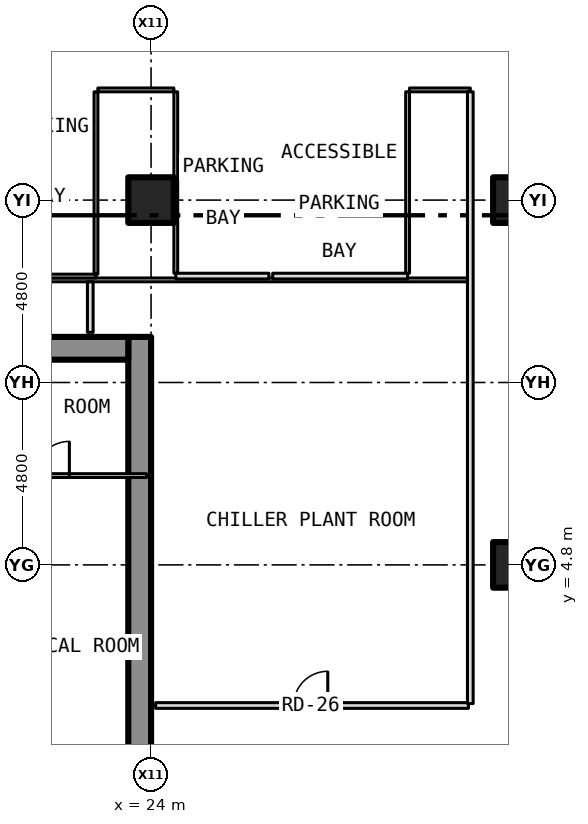
"""IFC4 building model, lengths in metres.
Left out: names, types, materials, properties, quantities, classifications, styles, units other than length and angle.
Written with IfcOpenShell. Run it as: python <this file> out.ifc"""

import sys

from ifc_helpers import new_model, si_unit, direction, frame, frame_2d, origin, origin_2d, place, context, subcontext, project, spatial, rectangle, hollow_rectangle, extrude, element, fill, save


model = new_model("IFC4")
c1 = context("Model", 3, precision=1e-05, world=origin(), true_north=direction((0.0, 1.0)))
c2 = subcontext(c1, "Body", "Model", "MODEL_VIEW")
j1 = project(units=[si_unit("LENGTHUNIT", "METRE"), si_unit("PLANEANGLEUNIT", "RADIAN")], contexts=[c1])
p1 = place(None, origin())
s1 = spatial("IfcSite", under=j1, at=p1, CompositionType="ELEMENT")
p2 = place(p1, origin())
s2 = spatial("IfcBuilding", under=s1, at=p2, CompositionType="ELEMENT")
p3 = place(p2, frame((0.0, 0.0, -5.0)))
s3 = spatial("IfcBuildingStorey", under=s2, at=p3, CompositionType="ELEMENT", Elevation=-5.0)
for number, where, z_axis, x_axis in (
    (1, (33.6, 4.8, -0.3), (0.0, 0.0, 1.0), (1.0, 0.0, 0.0)),
    (2, (33.6, 14.4, -0.3), (0.0, 0.0, 1.0), (1.0, 0.0, 0.0)),
    (3, (24.0, 14.4, -0.3), (0.0, 0.0, 1.0), (1.0, 0.0, 0.0)),
):
    element("IfcColumn", number, at=place(p3, frame(where, z_axis=z_axis, x_axis=x_axis)), inside=s3, PredefinedType="COLUMN", context=c2, shape_type="SweptSolid", body=[
        extrude(hollow_rectangle(XDim=1.2, YDim=1.2, WallThickness=0.07, at=origin_2d()), origin(), (0.0, 0.0, 1.0), 5.0),
    ])
p4 = place(p3, frame((23.7, -10.8, 0.0), z_axis=(0.0, 0.0, 1.0), x_axis=(0.0, 1.0, 0.0)))
e4 = element("IfcWall", 4, at=p4, inside=s3, PredefinedType="SHEAR", context=c2, shape_type="SweptSolid", body=[
    extrude(rectangle(XDim=21.6, YDim=0.6, at=frame_2d((10.8, 0.0))), origin(), (0.0, 0.0, 1.0), 4.7),
])
p5 = place(p3, frame((16.4, 10.5, 0.0), z_axis=(0.0, 0.0, 1.0), x_axis=(1.0, 0.0, 0.0)))
e5 = element("IfcWall", 5, at=p5, inside=s3, PredefinedType="SHEAR", context=c2, shape_type="SweptSolid", body=[
    extrude(rectangle(XDim=7.0, YDim=0.6, at=frame_2d((3.5, 0.0))), origin(), (0.0, 0.0, 1.0), 4.7),
])
p6 = place(p3, frame((24.12, 1.1, 0.0), z_axis=(0.0, 0.0, 1.0), x_axis=(1.0, 0.0, 0.0)))
e6 = element("IfcWall", 6, at=p6, inside=s3, PredefinedType="PARTITIONING", context=c2, shape_type="SweptSolid", body=[
    extrude(rectangle(XDim=8.23, YDim=0.15, at=frame_2d((4.115, 0.0))), origin(), (0.0, 0.0, 1.0), 4.7),
])
p7 = place(p6, frame((3.63, 0.0, 0.0)))
e7 = element("IfcOpeningElement", 7, at=p7, cuts=e6, PredefinedType="OPENING", context=c2, shape_type="SweptSolid", body=[
    extrude(rectangle(XDim=0.9, YDim=2.1, at=frame_2d((0.45, 1.05))), frame((0.0, 0.087, 0.0), z_axis=(0.0, -1.0, 0.0), x_axis=(1.0, 0.0, 0.0)), (0.0, 0.0, 1.0), 0.174),
])
p8 = place(p3, frame((18.8, 7.15, 0.0), z_axis=(0.0, 0.0, 1.0), x_axis=(1.0, 0.0, 0.0)))
e8 = element("IfcWall", 8, at=p8, inside=s3, PredefinedType="PARTITIONING", context=c2, shape_type="SweptSolid", body=[
    extrude(rectangle(XDim=5.08, YDim=0.1, at=frame_2d((2.54, 0.0))), origin(), (0.0, 0.0, 1.0), 4.7),
])
p9 = place(p8, frame((2.15, 0.0, 0.0)))
e9 = element("IfcOpeningElement", 9, at=p9, cuts=e8, PredefinedType="OPENING", context=c2, shape_type="SweptSolid", body=[
    extrude(rectangle(XDim=0.9, YDim=2.1, at=frame_2d((0.45, 1.05))), frame((0.0, 0.062, 0.0), z_axis=(0.0, -1.0, 0.0), x_axis=(1.0, 0.0, 0.0)), (0.0, 0.0, 1.0), 0.124),
])
p10 = place(p3, frame((-37.6, 12.3, 0.0), z_axis=(0.0, 0.0, 1.0), x_axis=(1.0, 0.0, 0.0)))
e10 = element("IfcWall", 10, at=p10, inside=s3, PredefinedType="PARTITIONING", context=c2, shape_type="SweptSolid", body=[
    extrude(rectangle(XDim=70.0, YDim=0.1, at=frame_2d((35.0, 0.0))), origin(), (0.0, 0.0, 1.0), 4.7),
])
p11 = place(p3, frame((20.1, 12.4, 0.0), z_axis=(0.0, 0.0, 1.0), x_axis=(1.0, 0.0, 0.0)))
e11 = element("IfcWall", 11, at=p11, inside=s3, PredefinedType="PARTITIONING", context=c2, shape_type="SweptSolid", body=[
    extrude(rectangle(XDim=2.45, YDim=0.1, at=frame_2d((1.225, 0.0))), origin(), (0.0, 0.0, 1.0), 4.7),
])
p12 = place(p3, frame((24.65, 12.4, 0.0), z_axis=(0.0, 0.0, 1.0), x_axis=(1.0, 0.0, 0.0)))
e12 = element("IfcWall", 12, at=p12, inside=s3, PredefinedType="PARTITIONING", context=c2, shape_type="SweptSolid", body=[
    extrude(rectangle(XDim=2.45, YDim=0.15, at=frame_2d((1.225, 0.0))), origin(), (0.0, 0.0, 1.0), 4.7),
])
p13 = place(p3, frame((27.2, 12.4, 0.0), z_axis=(0.0, 0.0, 1.0), x_axis=(1.0, 0.0, 0.0)))
e13 = element("IfcWall", 13, at=p13, inside=s3, PredefinedType="PARTITIONING", context=c2, shape_type="SweptSolid", body=[
    extrude(rectangle(XDim=3.55, YDim=0.15, at=frame_2d((1.775, 0.0))), origin(), (0.0, 0.0, 1.0), 4.7),
])
p14 = place(p3, frame((22.6, 17.3, 0.0), z_axis=(0.0, 0.0, 1.0), x_axis=(1.0, 0.0, 0.0)))
e14 = element("IfcWall", 14, at=p14, inside=s3, PredefinedType="PARTITIONING", context=c2, shape_type="SweptSolid", body=[
    extrude(rectangle(XDim=2.0, YDim=0.1, at=frame_2d((1.0, 0.0))), origin(), (0.0, 0.0, 1.0), 4.7),
])
p15 = place(p3, frame((30.8, 17.3, 0.0), z_axis=(0.0, 0.0, 1.0), x_axis=(1.0, 0.0, 0.0)))
e15 = element("IfcWall", 15, at=p15, inside=s3, PredefinedType="PARTITIONING", context=c2, shape_type="SweptSolid", body=[
    extrude(rectangle(XDim=1.6, YDim=0.1, at=frame_2d((0.8, 0.0))), origin(), (0.0, 0.0, 1.0), 4.7),
])
p16 = place(p3, frame((22.4, 10.92, 0.0), z_axis=(0.0, 0.0, 1.0), x_axis=(0.0, 1.0, 0.0)))
e16 = element("IfcWall", 16, at=p16, inside=s3, PredefinedType="PARTITIONING", context=c2, shape_type="SweptSolid", body=[
    extrude(rectangle(XDim=1.33, YDim=0.15, at=frame_2d((0.665, 0.0))), origin(), (0.0, 0.0, 1.0), 4.7),
])
p17 = place(p3, frame((22.55, 12.45, 0.0), z_axis=(0.0, 0.0, 1.0), x_axis=(0.0, 1.0, 0.0)))
e17 = element("IfcWall", 17, at=p17, inside=s3, PredefinedType="PARTITIONING", context=c2, shape_type="SweptSolid", body=[
    extrude(rectangle(XDim=4.8, YDim=0.1, at=frame_2d((2.4, 0.0))), origin(), (0.0, 0.0, 1.0), 4.7),
])
for number, where, z_axis, x_axis in (
    (18, (24.65, 12.475, 0.0), (0.0, 0.0, 1.0), (0.0, 1.0, 0.0)),
    (19, (30.75, 12.475, 0.0), (0.0, 0.0, 1.0), (0.0, 1.0, 0.0)),
):
    element("IfcWall", number, at=place(p3, frame(where, z_axis=z_axis, x_axis=x_axis)), inside=s3, PredefinedType="PARTITIONING", context=c2, shape_type="SweptSolid", body=[
        extrude(rectangle(XDim=4.775, YDim=0.1, at=frame_2d((2.387, 0.0))), origin(), (0.0, 0.0, 1.0), 4.7),
    ])
p18 = place(p3, frame((32.4, 1.15, 0.0), z_axis=(0.0, 0.0, 1.0), x_axis=(0.0, 1.0, 0.0)))
e20 = element("IfcWall", 20, at=p18, inside=s3, PredefinedType="PARTITIONING", context=c2, shape_type="SweptSolid", body=[
    extrude(rectangle(XDim=16.1, YDim=0.15, at=frame_2d((8.05, 0.0))), origin(), (0.0, 0.0, 1.0), 4.7),
])
p19 = place(p9, origin())
e21 = element("IfcDoor", 21, at=p19, inside=s3, OperationType="SINGLE_SWING_RIGHT", PredefinedType="DOOR", context=c2, shape_type="SweptSolid", body=[
    extrude(rectangle(XDim=0.9, YDim=2.1, at=frame_2d((0.45, 1.05))), frame((0.0, 0.025, 0.0), z_axis=(0.0, -1.0, 0.0), x_axis=(1.0, 0.0, 0.0)), (0.0, 0.0, 1.0), 0.05),
])
fill(e9, e21)
p20 = place(p7, origin())
e22 = element("IfcDoor", 22, at=p20, inside=s3, OperationType="SINGLE_SWING_RIGHT", PredefinedType="DOOR", context=c2, shape_type="SweptSolid", body=[
    extrude(rectangle(XDim=0.9, YDim=2.1, at=frame_2d((0.45, 1.05))), frame((0.0, 0.025, 0.0), z_axis=(0.0, -1.0, 0.0), x_axis=(1.0, 0.0, 0.0)), (0.0, 0.0, 1.0), 0.05),
])
fill(e7, e22)
save(model, sys.argv[1])
